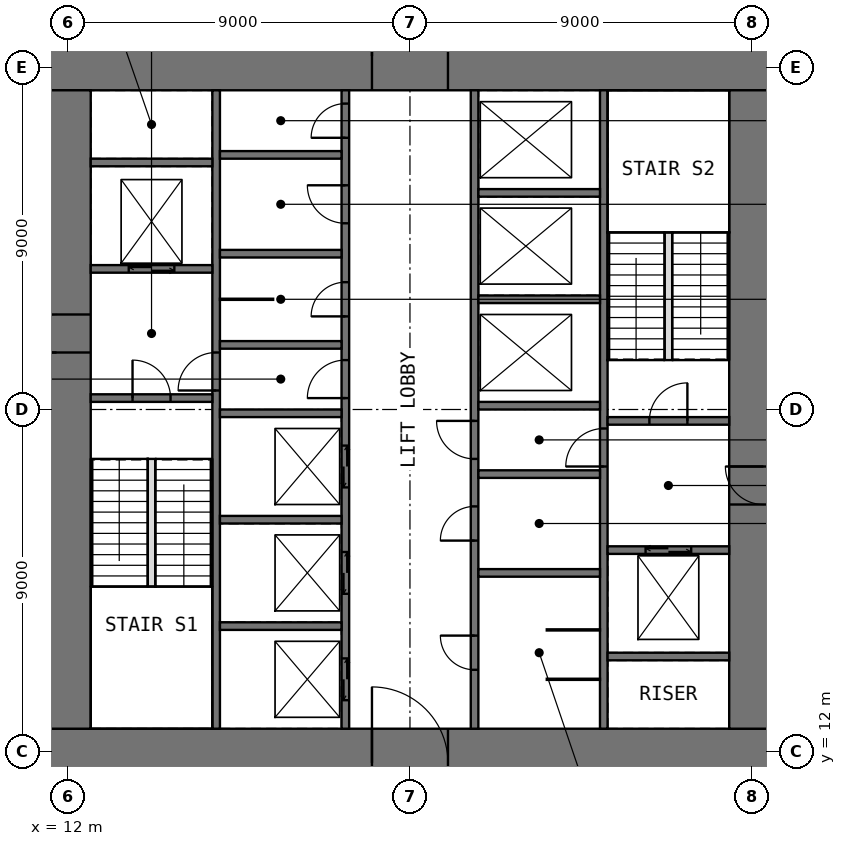
"""IFC4 building model, lengths in metres.
Left out: names, types, materials, properties, quantities, classifications, styles, units other than length and angle.
Written with IfcOpenShell. Run it as: python <this file> out.ifc"""

import sys

from ifc_helpers import new_model, si_unit, direction, frame, frame_2d, origin, place, context, subcontext, project, spatial, rectangle, extrude, element, fill, save


model = new_model("IFC4")
c1 = context("Model", 3, precision=1e-05, world=origin(), true_north=direction((0.0, 1.0)))
c2 = subcontext(c1, "Body", "Model", "MODEL_VIEW")
j1 = project(units=[si_unit("LENGTHUNIT", "METRE"), si_unit("PLANEANGLEUNIT", "RADIAN")], contexts=[c1])
p1 = place(None, origin())
s1 = spatial("IfcSite", under=j1, at=p1, CompositionType="ELEMENT")
p2 = place(p1, origin())
s2 = spatial("IfcBuilding", under=s1, at=p2, CompositionType="ELEMENT")
p3 = place(p2, frame((0.0, 0.0, 18.0)))
s3 = spatial("IfcBuildingStorey", under=s2, at=p3, CompositionType="ELEMENT", Elevation=18.0)
p4 = place(p3, frame((10.8, 11.7, -0.2), z_axis=(0.0, 0.0, 1.0), x_axis=(1.0, 0.0, 0.0)))
e1 = element("IfcWall", 1, at=p4, inside=s3, PredefinedType="SHEAR", context=c2, shape_type="SweptSolid", body=[
    extrude(rectangle(XDim=20.4, YDim=1.8, at=frame_2d((10.2, 0.0))), origin(), (0.0, 0.0, 1.0), 4.65),
])
p5 = place(p4, frame((9.2, 0.0, 0.2)))
e2 = element("IfcOpeningElement", 2, at=p5, cuts=e1, PredefinedType="OPENING", context=c2, shape_type="SweptSolid", body=[
    extrude(rectangle(XDim=2.0, YDim=2.2, at=frame_2d((1.0, 1.1))), frame((0.0, 0.91, 0.0), z_axis=(0.0, -1.0, 0.0), x_axis=(1.0, 0.0, 0.0)), (0.0, 0.0, 1.0), 1.82),
])
p6 = place(p3, frame((10.8, 30.3, -0.2), z_axis=(0.0, 0.0, 1.0), x_axis=(1.0, 0.0, 0.0)))
e3 = element("IfcWall", 3, at=p6, inside=s3, PredefinedType="SHEAR", context=c2, shape_type="SweptSolid", body=[
    extrude(rectangle(XDim=20.4, YDim=1.8, at=frame_2d((10.2, 0.0))), origin(), (0.0, 0.0, 1.0), 4.65),
])
p7 = place(p6, frame((9.2, 0.0, 0.2)))
e4 = element("IfcOpeningElement", 4, at=p7, cuts=e3, PredefinedType="OPENING", context=c2, shape_type="SweptSolid", body=[
    extrude(rectangle(XDim=2.0, YDim=2.2, at=frame_2d((1.0, 1.1))), frame((0.0, 0.91, 0.0), z_axis=(0.0, -1.0, 0.0), x_axis=(1.0, 0.0, 0.0)), (0.0, 0.0, 1.0), 1.82),
])
p8 = place(p3, frame((11.7, 12.6, -0.2), z_axis=(0.0, 0.0, 1.0), x_axis=(0.0, 1.0, 0.0)))
e5 = element("IfcWall", 5, at=p8, inside=s3, PredefinedType="SHEAR", context=c2, shape_type="SweptSolid", body=[
    extrude(rectangle(XDim=16.8, YDim=1.8, at=frame_2d((8.4, 0.0))), origin(), (0.0, 0.0, 1.0), 4.65),
])
p9 = place(p8, frame((9.9, 0.0, 0.2)))
e6 = element("IfcOpeningElement", 6, at=p9, cuts=e5, PredefinedType="OPENING", context=c2, shape_type="SweptSolid", body=[
    extrude(rectangle(XDim=1.0, YDim=2.2, at=frame_2d((0.5, 1.1))), frame((0.0, 0.91, 0.0), z_axis=(0.0, -1.0, 0.0), x_axis=(1.0, 0.0, 0.0)), (0.0, 0.0, 1.0), 1.82),
])
p10 = place(p3, frame((30.3, 12.6, -0.2), z_axis=(0.0, 0.0, 1.0), x_axis=(0.0, 1.0, 0.0)))
e7 = element("IfcWall", 7, at=p10, inside=s3, PredefinedType="SHEAR", context=c2, shape_type="SweptSolid", body=[
    extrude(rectangle(XDim=16.8, YDim=1.8, at=frame_2d((8.4, 0.0))), origin(), (0.0, 0.0, 1.0), 4.65),
])
p11 = place(p10, frame((5.9, 0.0, 0.2)))
e8 = element("IfcOpeningElement", 8, at=p11, cuts=e7, PredefinedType="OPENING", context=c2, shape_type="SweptSolid", body=[
    extrude(rectangle(XDim=1.0, YDim=2.2, at=frame_2d((0.5, 1.1))), frame((0.0, 0.91, 0.0), z_axis=(0.0, -1.0, 0.0), x_axis=(1.0, 0.0, 0.0)), (0.0, 0.0, 1.0), 1.82),
])
p12 = place(p3, frame((15.9, 12.6, -0.2), z_axis=(0.0, 0.0, 1.0), x_axis=(0.0, 1.0, 0.0)))
e9 = element("IfcWall", 9, at=p12, inside=s3, PredefinedType="SHEAR", context=c2, shape_type="SweptSolid", body=[
    extrude(rectangle(XDim=16.8, YDim=0.2, at=frame_2d((8.4, 0.0))), origin(), (0.0, 0.0, 1.0), 4.65),
])
p13 = place(p12, frame((8.9, 0.0, 0.2)))
e10 = element("IfcOpeningElement", 10, at=p13, cuts=e9, PredefinedType="OPENING", context=c2, shape_type="SweptSolid", body=[
    extrude(rectangle(XDim=1.0, YDim=2.2, at=frame_2d((0.5, 1.1))), frame((0.0, 0.11, 0.0), z_axis=(0.0, -1.0, 0.0), x_axis=(1.0, 0.0, 0.0)), (0.0, 0.0, 1.0), 0.22),
])
p14 = place(p3, frame((19.3, 12.6, -0.2), z_axis=(0.0, 0.0, 1.0), x_axis=(0.0, 1.0, 0.0)))
e11 = element("IfcWall", 11, at=p14, inside=s3, PredefinedType="SHEAR", context=c2, shape_type="SweptSolid", body=[
    extrude(rectangle(XDim=16.8, YDim=0.2, at=frame_2d((8.4, 0.0))), origin(), (0.0, 0.0, 1.0), 4.65),
])
p15 = place(p14, frame((8.7, 0.0, 0.2)))
e12 = element("IfcOpeningElement", 12, at=p15, cuts=e11, PredefinedType="OPENING", context=c2, shape_type="SweptSolid", body=[
    extrude(rectangle(XDim=1.0, YDim=2.2, at=frame_2d((0.5, 1.1))), frame((0.0, 0.11, 0.0), z_axis=(0.0, -1.0, 0.0), x_axis=(1.0, 0.0, 0.0)), (0.0, 0.0, 1.0), 0.22),
])
p16 = place(p14, frame((10.85, 0.0, 0.2)))
e13 = element("IfcOpeningElement", 13, at=p16, cuts=e11, PredefinedType="OPENING", context=c2, shape_type="SweptSolid", body=[
    extrude(rectangle(XDim=0.9, YDim=2.2, at=frame_2d((0.45, 1.1))), frame((0.0, 0.11, 0.0), z_axis=(0.0, -1.0, 0.0), x_axis=(1.0, 0.0, 0.0)), (0.0, 0.0, 1.0), 0.22),
])
p17 = place(p14, frame((13.3, 0.0, 0.2)))
e14 = element("IfcOpeningElement", 14, at=p17, cuts=e11, PredefinedType="OPENING", context=c2, shape_type="SweptSolid", body=[
    extrude(rectangle(XDim=1.0, YDim=2.2, at=frame_2d((0.5, 1.1))), frame((0.0, 0.11, 0.0), z_axis=(0.0, -1.0, 0.0), x_axis=(1.0, 0.0, 0.0)), (0.0, 0.0, 1.0), 0.22),
])
p18 = place(p14, frame((15.55, 0.0, 0.2)))
e15 = element("IfcOpeningElement", 15, at=p18, cuts=e11, PredefinedType="OPENING", context=c2, shape_type="SweptSolid", body=[
    extrude(rectangle(XDim=0.9, YDim=2.2, at=frame_2d((0.45, 1.1))), frame((0.0, 0.11, 0.0), z_axis=(0.0, -1.0, 0.0), x_axis=(1.0, 0.0, 0.0)), (0.0, 0.0, 1.0), 0.22),
])
p19 = place(p14, frame((0.75, 0.0, 0.2)))
e16 = element("IfcOpeningElement", 16, at=p19, cuts=e11, PredefinedType="OPENING", context=c2, shape_type="SweptSolid", body=[
    extrude(rectangle(XDim=1.1, YDim=2.2, at=frame_2d((0.55, 1.1))), frame((0.0, 0.11, 0.0), z_axis=(0.0, -1.0, 0.0), x_axis=(1.0, 0.0, 0.0)), (0.0, 0.0, 1.0), 0.22),
])
p20 = place(p14, frame((3.55, 0.0, 0.2)))
e17 = element("IfcOpeningElement", 17, at=p20, cuts=e11, PredefinedType="OPENING", context=c2, shape_type="SweptSolid", body=[
    extrude(rectangle(XDim=1.1, YDim=2.2, at=frame_2d((0.55, 1.1))), frame((0.0, 0.11, 0.0), z_axis=(0.0, -1.0, 0.0), x_axis=(1.0, 0.0, 0.0)), (0.0, 0.0, 1.0), 0.22),
])
p21 = place(p14, frame((6.35, 0.0, 0.2)))
e18 = element("IfcOpeningElement", 18, at=p21, cuts=e11, PredefinedType="OPENING", context=c2, shape_type="SweptSolid", body=[
    extrude(rectangle(XDim=1.1, YDim=2.2, at=frame_2d((0.55, 1.1))), frame((0.0, 0.11, 0.0), z_axis=(0.0, -1.0, 0.0), x_axis=(1.0, 0.0, 0.0)), (0.0, 0.0, 1.0), 0.22),
])
p22 = place(p3, frame((22.7, 12.6, -0.2), z_axis=(0.0, 0.0, 1.0), x_axis=(0.0, 1.0, 0.0)))
e19 = element("IfcWall", 19, at=p22, inside=s3, PredefinedType="SHEAR", context=c2, shape_type="SweptSolid", body=[
    extrude(rectangle(XDim=16.8, YDim=0.2, at=frame_2d((8.4, 0.0))), origin(), (0.0, 0.0, 1.0), 4.65),
])
p23 = place(p22, frame((7.1, 0.0, 0.2)))
e20 = element("IfcOpeningElement", 20, at=p23, cuts=e19, PredefinedType="OPENING", context=c2, shape_type="SweptSolid", body=[
    extrude(rectangle(XDim=1.0, YDim=2.2, at=frame_2d((0.5, 1.1))), frame((0.0, 0.11, 0.0), z_axis=(0.0, -1.0, 0.0), x_axis=(1.0, 0.0, 0.0)), (0.0, 0.0, 1.0), 0.22),
])
p24 = place(p22, frame((1.55, 0.0, 0.2)))
e21 = element("IfcOpeningElement", 21, at=p24, cuts=e19, PredefinedType="OPENING", context=c2, shape_type="SweptSolid", body=[
    extrude(rectangle(XDim=0.9, YDim=2.2, at=frame_2d((0.45, 1.1))), frame((0.0, 0.11, 0.0), z_axis=(0.0, -1.0, 0.0), x_axis=(1.0, 0.0, 0.0)), (0.0, 0.0, 1.0), 0.22),
])
p25 = place(p22, frame((4.95, 0.0, 0.2)))
e22 = element("IfcOpeningElement", 22, at=p25, cuts=e19, PredefinedType="OPENING", context=c2, shape_type="SweptSolid", body=[
    extrude(rectangle(XDim=0.9, YDim=2.2, at=frame_2d((0.45, 1.1))), frame((0.0, 0.11, 0.0), z_axis=(0.0, -1.0, 0.0), x_axis=(1.0, 0.0, 0.0)), (0.0, 0.0, 1.0), 0.22),
])
p26 = place(p3, frame((26.1, 12.6, -0.2), z_axis=(0.0, 0.0, 1.0), x_axis=(0.0, 1.0, 0.0)))
e23 = element("IfcWall", 23, at=p26, inside=s3, PredefinedType="SHEAR", context=c2, shape_type="SweptSolid", body=[
    extrude(rectangle(XDim=16.8, YDim=0.2, at=frame_2d((8.4, 0.0))), origin(), (0.0, 0.0, 1.0), 4.65),
])
p27 = place(p26, frame((6.9, 0.0, 0.2)))
e24 = element("IfcOpeningElement", 24, at=p27, cuts=e23, PredefinedType="OPENING", context=c2, shape_type="SweptSolid", body=[
    extrude(rectangle(XDim=1.0, YDim=2.2, at=frame_2d((0.5, 1.1))), frame((0.0, 0.11, 0.0), z_axis=(0.0, -1.0, 0.0), x_axis=(1.0, 0.0, 0.0)), (0.0, 0.0, 1.0), 0.22),
])
p28 = place(p3, frame((12.6, 21.3, -0.2), z_axis=(0.0, 0.0, 1.0), x_axis=(1.0, 0.0, 0.0)))
e25 = element("IfcWall", 25, at=p28, inside=s3, PredefinedType="SHEAR", context=c2, shape_type="SweptSolid", body=[
    extrude(rectangle(XDim=3.2, YDim=0.2, at=frame_2d((1.6, 0.0))), origin(), (0.0, 0.0, 1.0), 4.65),
])
p29 = place(p28, frame((1.1, 0.0, 0.2)))
e26 = element("IfcOpeningElement", 26, at=p29, cuts=e25, PredefinedType="OPENING", context=c2, shape_type="SweptSolid", body=[
    extrude(rectangle(XDim=1.0, YDim=2.2, at=frame_2d((0.5, 1.1))), frame((0.0, 0.11, 0.0), z_axis=(0.0, -1.0, 0.0), x_axis=(1.0, 0.0, 0.0)), (0.0, 0.0, 1.0), 0.22),
])
p30 = place(p3, frame((12.6, 24.7, -0.2), z_axis=(0.0, 0.0, 1.0), x_axis=(1.0, 0.0, 0.0)))
e27 = element("IfcWall", 27, at=p30, inside=s3, PredefinedType="SHEAR", context=c2, shape_type="SweptSolid", body=[
    extrude(rectangle(XDim=3.2, YDim=0.2, at=frame_2d((1.6, 0.0))), origin(), (0.0, 0.0, 1.0), 4.65),
])
p31 = place(p30, frame((1.0, 0.0, 0.2)))
e28 = element("IfcOpeningElement", 28, at=p31, cuts=e27, PredefinedType="OPENING", context=c2, shape_type="SweptSolid", body=[
    extrude(rectangle(XDim=1.2, YDim=2.2, at=frame_2d((0.6, 1.1))), frame((0.0, 0.11, 0.0), z_axis=(0.0, -1.0, 0.0), x_axis=(1.0, 0.0, 0.0)), (0.0, 0.0, 1.0), 0.22),
])
for number, where, z_axis, x_axis in (
    (29, (12.6, 27.5, -0.2), (0.0, 0.0, 1.0), (1.0, 0.0, 0.0)),
    (30, (16.0, 15.3, -0.2), (0.0, 0.0, 1.0), (1.0, 0.0, 0.0)),
    (31, (16.0, 18.1, -0.2), (0.0, 0.0, 1.0), (1.0, 0.0, 0.0)),
    (32, (16.0, 20.9, -0.2), (0.0, 0.0, 1.0), (1.0, 0.0, 0.0)),
    (33, (16.0, 22.7, -0.2), (0.0, 0.0, 1.0), (1.0, 0.0, 0.0)),
    (34, (16.0, 25.1, -0.2), (0.0, 0.0, 1.0), (1.0, 0.0, 0.0)),
    (35, (16.0, 27.7, -0.2), (0.0, 0.0, 1.0), (1.0, 0.0, 0.0)),
    (36, (22.8, 16.7, -0.2), (0.0, 0.0, 1.0), (1.0, 0.0, 0.0)),
    (37, (22.8, 19.3, -0.2), (0.0, 0.0, 1.0), (1.0, 0.0, 0.0)),
    (38, (22.8, 21.1, -0.2), (0.0, 0.0, 1.0), (1.0, 0.0, 0.0)),
    (39, (22.8, 23.9, -0.2), (0.0, 0.0, 1.0), (1.0, 0.0, 0.0)),
    (40, (22.8, 26.7, -0.2), (0.0, 0.0, 1.0), (1.0, 0.0, 0.0)),
    (41, (26.2, 14.5, -0.2), (0.0, 0.0, 1.0), (1.0, 0.0, 0.0)),
):
    element("IfcWall", number, at=place(p3, frame(where, z_axis=z_axis, x_axis=x_axis)), inside=s3, PredefinedType="SHEAR", context=c2, shape_type="SweptSolid", body=[
        extrude(rectangle(XDim=3.2, YDim=0.2, at=frame_2d((1.6, 0.0))), origin(), (0.0, 0.0, 1.0), 4.65),
    ])
p32 = place(p3, frame((26.2, 17.3, -0.2), z_axis=(0.0, 0.0, 1.0), x_axis=(1.0, 0.0, 0.0)))
e42 = element("IfcWall", 42, at=p32, inside=s3, PredefinedType="SHEAR", context=c2, shape_type="SweptSolid", body=[
    extrude(rectangle(XDim=3.2, YDim=0.2, at=frame_2d((1.6, 0.0))), origin(), (0.0, 0.0, 1.0), 4.65),
])
p33 = place(p32, frame((1.0, 0.0, 0.2)))
e43 = element("IfcOpeningElement", 43, at=p33, cuts=e42, PredefinedType="OPENING", context=c2, shape_type="SweptSolid", body=[
    extrude(rectangle(XDim=1.2, YDim=2.2, at=frame_2d((0.6, 1.1))), frame((0.0, 0.11, 0.0), z_axis=(0.0, -1.0, 0.0), x_axis=(1.0, 0.0, 0.0)), (0.0, 0.0, 1.0), 0.22),
])
p34 = place(p3, frame((26.2, 20.7, -0.2), z_axis=(0.0, 0.0, 1.0), x_axis=(1.0, 0.0, 0.0)))
e44 = element("IfcWall", 44, at=p34, inside=s3, PredefinedType="SHEAR", context=c2, shape_type="SweptSolid", body=[
    extrude(rectangle(XDim=3.2, YDim=0.2, at=frame_2d((1.6, 0.0))), origin(), (0.0, 0.0, 1.0), 4.65),
])
p35 = place(p34, frame((1.1, 0.0, 0.2)))
e45 = element("IfcOpeningElement", 45, at=p35, cuts=e44, PredefinedType="OPENING", context=c2, shape_type="SweptSolid", body=[
    extrude(rectangle(XDim=1.0, YDim=2.2, at=frame_2d((0.5, 1.1))), frame((0.0, 0.11, 0.0), z_axis=(0.0, -1.0, 0.0), x_axis=(1.0, 0.0, 0.0)), (0.0, 0.0, 1.0), 0.22),
])
for number, where, z_axis, x_axis in (
    (46, (24.6, 13.9, 0.0), (0.0, 0.0, 1.0), (1.0, 0.0, 0.0)),
    (47, (24.6, 15.2, 0.0), (0.0, 0.0, 1.0), (1.0, 0.0, 0.0)),
    (48, (16.0, 23.9, 0.0), (0.0, 0.0, 1.0), (1.0, 0.0, 0.0)),
):
    element("IfcWall", number, at=place(p3, frame(where, z_axis=z_axis, x_axis=x_axis)), inside=s3, PredefinedType="PARTITIONING", context=c2, shape_type="SweptSolid", body=[
        extrude(rectangle(XDim=1.4, YDim=0.03, at=frame_2d((0.7, 0.0))), origin(), (0.0, 0.0, 1.0), 4.25),
    ])
for number, where, z_axis, x_axis in (
    (49, (14.2, 16.34, 0.0), (0.0, 0.0, 1.0), (0.0, 1.0, 0.0)),
    (50, (27.8, 22.3, 0.0), (0.0, 0.0, 1.0), (0.0, 1.0, 0.0)),
):
    element("IfcWall", number, at=place(p3, frame(where, z_axis=z_axis, x_axis=x_axis)), inside=s3, PredefinedType="PARTITIONING", context=c2, shape_type="SweptSolid", body=[
        extrude(rectangle(XDim=3.36, YDim=0.2, at=frame_2d((1.68, 0.0))), origin(), (0.0, 0.0, 1.0), 4.5),
    ])
p36 = place(p5, origin())
e51 = element("IfcDoor", 51, at=p36, inside=s3, OperationType="DOUBLE_DOOR_SINGLE_SWING", PredefinedType="DOOR", context=c2, shape_type="SweptSolid", body=[
    extrude(rectangle(XDim=2.0, YDim=2.2, at=frame_2d((1.0, 1.1))), frame((0.0, 0.025, 0.0), z_axis=(0.0, -1.0, 0.0), x_axis=(1.0, 0.0, 0.0)), (0.0, 0.0, 1.0), 0.05),
])
fill(e2, e51)
p37 = place(p7, origin())
e52 = element("IfcDoor", 52, at=p37, inside=s3, OperationType="DOUBLE_DOOR_SINGLE_SWING", PredefinedType="DOOR", context=c2, shape_type="SweptSolid", body=[
    extrude(rectangle(XDim=2.0, YDim=2.2, at=frame_2d((1.0, 1.1))), frame((0.0, 0.025, 0.0), z_axis=(0.0, -1.0, 0.0), x_axis=(1.0, 0.0, 0.0)), (0.0, 0.0, 1.0), 0.05),
])
fill(e4, e52)
p38 = place(p9, origin())
e53 = element("IfcDoor", 53, at=p38, inside=s3, OperationType="SINGLE_SWING_LEFT", PredefinedType="DOOR", context=c2, shape_type="SweptSolid", body=[
    extrude(rectangle(XDim=1.0, YDim=2.2, at=frame_2d((0.5, 1.1))), frame((0.0, 0.025, 0.0), z_axis=(0.0, -1.0, 0.0), x_axis=(1.0, 0.0, 0.0)), (0.0, 0.0, 1.0), 0.05),
])
fill(e6, e53)
p39 = place(p11, origin())
e54 = element("IfcDoor", 54, at=p39, inside=s3, OperationType="SINGLE_SWING_RIGHT", PredefinedType="DOOR", context=c2, shape_type="SweptSolid", body=[
    extrude(rectangle(XDim=1.0, YDim=2.2, at=frame_2d((0.5, 1.1))), frame((0.0, 0.025, 0.0), z_axis=(0.0, -1.0, 0.0), x_axis=(1.0, 0.0, 0.0)), (0.0, 0.0, 1.0), 0.05),
])
fill(e8, e54)
p40 = place(p29, origin())
e55 = element("IfcDoor", 55, at=p40, inside=s3, OperationType="SINGLE_SWING_LEFT", PredefinedType="DOOR", context=c2, shape_type="SweptSolid", body=[
    extrude(rectangle(XDim=1.0, YDim=2.2, at=frame_2d((0.5, 1.1))), frame((0.0, 0.025, 0.0), z_axis=(0.0, -1.0, 0.0), x_axis=(1.0, 0.0, 0.0)), (0.0, 0.0, 1.0), 0.05),
])
fill(e26, e55)
p41 = place(p35, origin())
e56 = element("IfcDoor", 56, at=p41, inside=s3, OperationType="SINGLE_SWING_RIGHT", PredefinedType="DOOR", context=c2, shape_type="SweptSolid", body=[
    extrude(rectangle(XDim=1.0, YDim=2.2, at=frame_2d((0.5, 1.1))), frame((0.0, 0.025, 0.0), z_axis=(0.0, -1.0, 0.0), x_axis=(1.0, 0.0, 0.0)), (0.0, 0.0, 1.0), 0.05),
])
fill(e45, e56)
p42 = place(p13, origin())
e57 = element("IfcDoor", 57, at=p42, inside=s3, OperationType="SINGLE_SWING_LEFT", PredefinedType="DOOR", context=c2, shape_type="SweptSolid", body=[
    extrude(rectangle(XDim=1.0, YDim=2.2, at=frame_2d((0.5, 1.1))), frame((0.0, 0.025, 0.0), z_axis=(0.0, -1.0, 0.0), x_axis=(1.0, 0.0, 0.0)), (0.0, 0.0, 1.0), 0.05),
])
fill(e10, e57)
p43 = place(p27, origin())
e58 = element("IfcDoor", 58, at=p43, inside=s3, OperationType="SINGLE_SWING_LEFT", PredefinedType="DOOR", context=c2, shape_type="SweptSolid", body=[
    extrude(rectangle(XDim=1.0, YDim=2.2, at=frame_2d((0.5, 1.1))), frame((0.0, 0.025, 0.0), z_axis=(0.0, -1.0, 0.0), x_axis=(1.0, 0.0, 0.0)), (0.0, 0.0, 1.0), 0.05),
])
fill(e24, e58)
p44 = place(p15, origin())
e59 = element("IfcDoor", 59, at=p44, inside=s3, OperationType="SINGLE_SWING_LEFT", PredefinedType="DOOR", context=c2, shape_type="SweptSolid", body=[
    extrude(rectangle(XDim=1.0, YDim=2.2, at=frame_2d((0.5, 1.1))), frame((0.0, 0.025, 0.0), z_axis=(0.0, -1.0, 0.0), x_axis=(1.0, 0.0, 0.0)), (0.0, 0.0, 1.0), 0.05),
])
fill(e12, e59)
p45 = place(p23, origin())
e60 = element("IfcDoor", 60, at=p45, inside=s3, OperationType="SINGLE_SWING_RIGHT", PredefinedType="DOOR", context=c2, shape_type="SweptSolid", body=[
    extrude(rectangle(XDim=1.0, YDim=2.2, at=frame_2d((0.5, 1.1))), frame((0.0, 0.025, 0.0), z_axis=(0.0, -1.0, 0.0), x_axis=(1.0, 0.0, 0.0)), (0.0, 0.0, 1.0), 0.05),
])
fill(e20, e60)
p46 = place(p16, origin())
e61 = element("IfcDoor", 61, at=p46, inside=s3, OperationType="SINGLE_SWING_LEFT", PredefinedType="DOOR", context=c2, shape_type="SweptSolid", body=[
    extrude(rectangle(XDim=0.9, YDim=2.2, at=frame_2d((0.45, 1.1))), frame((0.0, 0.025, 0.0), z_axis=(0.0, -1.0, 0.0), x_axis=(1.0, 0.0, 0.0)), (0.0, 0.0, 1.0), 0.05),
])
fill(e13, e61)
p47 = place(p17, origin())
e62 = element("IfcDoor", 62, at=p47, inside=s3, OperationType="SINGLE_SWING_RIGHT", PredefinedType="DOOR", context=c2, shape_type="SweptSolid", body=[
    extrude(rectangle(XDim=1.0, YDim=2.2, at=frame_2d((0.5, 1.1))), frame((0.0, 0.025, 0.0), z_axis=(0.0, -1.0, 0.0), x_axis=(1.0, 0.0, 0.0)), (0.0, 0.0, 1.0), 0.05),
])
fill(e14, e62)
p48 = place(p18, origin())
e63 = element("IfcDoor", 63, at=p48, inside=s3, OperationType="SINGLE_SWING_LEFT", PredefinedType="DOOR", context=c2, shape_type="SweptSolid", body=[
    extrude(rectangle(XDim=0.9, YDim=2.2, at=frame_2d((0.45, 1.1))), frame((0.0, 0.025, 0.0), z_axis=(0.0, -1.0, 0.0), x_axis=(1.0, 0.0, 0.0)), (0.0, 0.0, 1.0), 0.05),
])
fill(e15, e63)
p49 = place(p24, origin())
e64 = element("IfcDoor", 64, at=p49, inside=s3, OperationType="SINGLE_SWING_RIGHT", PredefinedType="DOOR", context=c2, shape_type="SweptSolid", body=[
    extrude(rectangle(XDim=0.9, YDim=2.2, at=frame_2d((0.45, 1.1))), frame((0.0, 0.025, 0.0), z_axis=(0.0, -1.0, 0.0), x_axis=(1.0, 0.0, 0.0)), (0.0, 0.0, 1.0), 0.05),
])
fill(e21, e64)
p50 = place(p25, origin())
e65 = element("IfcDoor", 65, at=p50, inside=s3, OperationType="SINGLE_SWING_LEFT", PredefinedType="DOOR", context=c2, shape_type="SweptSolid", body=[
    extrude(rectangle(XDim=0.9, YDim=2.2, at=frame_2d((0.45, 1.1))), frame((0.0, 0.025, 0.0), z_axis=(0.0, -1.0, 0.0), x_axis=(1.0, 0.0, 0.0)), (0.0, 0.0, 1.0), 0.05),
])
fill(e22, e65)
p51 = place(p19, origin())
e66 = element("IfcDoor", 66, at=p51, inside=s3, OperationType="DOUBLE_DOOR_SLIDING", PredefinedType="DOOR", context=c2, shape_type="SweptSolid", body=[
    extrude(rectangle(XDim=1.1, YDim=2.2, at=frame_2d((0.55, 1.1))), frame((0.0, 0.025, 0.0), z_axis=(0.0, -1.0, 0.0), x_axis=(1.0, 0.0, 0.0)), (0.0, 0.0, 1.0), 0.05),
])
fill(e16, e66)
p52 = place(p20, origin())
e67 = element("IfcDoor", 67, at=p52, inside=s3, OperationType="DOUBLE_DOOR_SLIDING", PredefinedType="DOOR", context=c2, shape_type="SweptSolid", body=[
    extrude(rectangle(XDim=1.1, YDim=2.2, at=frame_2d((0.55, 1.1))), frame((0.0, 0.025, 0.0), z_axis=(0.0, -1.0, 0.0), x_axis=(1.0, 0.0, 0.0)), (0.0, 0.0, 1.0), 0.05),
])
fill(e17, e67)
p53 = place(p21, origin())
e68 = element("IfcDoor", 68, at=p53, inside=s3, OperationType="DOUBLE_DOOR_SLIDING", PredefinedType="DOOR", context=c2, shape_type="SweptSolid", body=[
    extrude(rectangle(XDim=1.1, YDim=2.2, at=frame_2d((0.55, 1.1))), frame((0.0, 0.025, 0.0), z_axis=(0.0, -1.0, 0.0), x_axis=(1.0, 0.0, 0.0)), (0.0, 0.0, 1.0), 0.05),
])
fill(e18, e68)
p54 = place(p31, origin())
e69 = element("IfcDoor", 69, at=p54, inside=s3, OperationType="DOUBLE_DOOR_SLIDING", PredefinedType="DOOR", context=c2, shape_type="SweptSolid", body=[
    extrude(rectangle(XDim=1.2, YDim=2.2, at=frame_2d((0.6, 1.1))), frame((0.0, 0.025, 0.0), z_axis=(0.0, -1.0, 0.0), x_axis=(1.0, 0.0, 0.0)), (0.0, 0.0, 1.0), 0.05),
])
fill(e28, e69)
p55 = place(p33, origin())
e70 = element("IfcDoor", 70, at=p55, inside=s3, OperationType="DOUBLE_DOOR_SLIDING", PredefinedType="DOOR", context=c2, shape_type="SweptSolid", body=[
    extrude(rectangle(XDim=1.2, YDim=2.2, at=frame_2d((0.6, 1.1))), frame((0.0, 0.025, 0.0), z_axis=(0.0, -1.0, 0.0), x_axis=(1.0, 0.0, 0.0)), (0.0, 0.0, 1.0), 0.05),
])
fill(e43, e70)
save(model, sys.argv[1])
